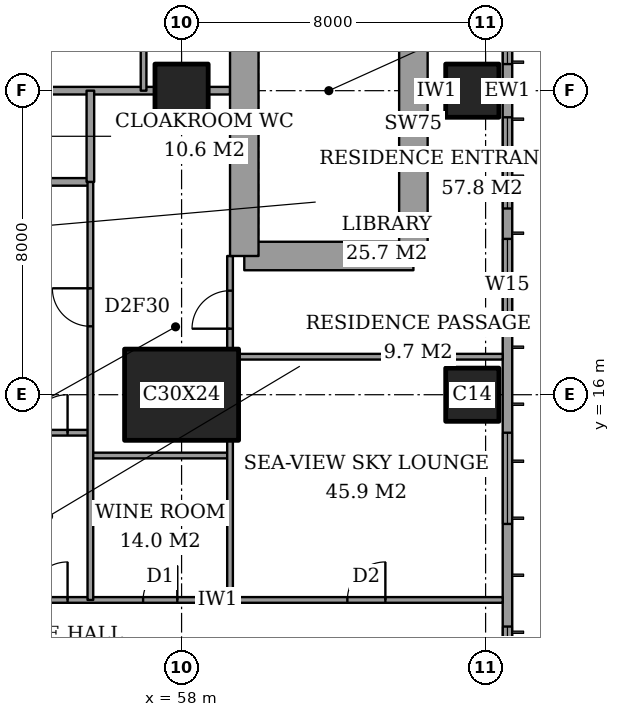
"""IFC4 building model, lengths in metres.
Left out: names, types, materials, properties, quantities, classifications, styles, units other than length and angle.
Written with IfcOpenShell. Run it as: python <this file> out.ifc"""

import sys

from ifc_helpers import new_model, si_unit, direction, frame, frame_2d, origin, origin_2d, place, context, subcontext, project, spatial, rectangle, extrude, element, fill, save


model = new_model("IFC4")
c1 = context("Model", 3, precision=1e-05, world=origin(), true_north=direction((0.0, 1.0)))
c2 = subcontext(c1, "Body", "Model", "MODEL_VIEW")
j1 = project(units=[si_unit("LENGTHUNIT", "METRE"), si_unit("PLANEANGLEUNIT", "RADIAN")], contexts=[c1])
p1 = place(None, origin())
s1 = spatial("IfcSite", under=j1, at=p1, CompositionType="ELEMENT")
p2 = place(p1, origin())
s2 = spatial("IfcBuilding", under=s1, at=p2, CompositionType="ELEMENT")
p3 = place(p2, frame((0.0, 0.0, 287.1)))
s3 = spatial("IfcBuildingStorey", under=s2, at=p3, CompositionType="ELEMENT", Elevation=287.1)
p4 = place(p3, frame((58.0, 16.0, 0.0), z_axis=(0.0, 0.0, 1.0), x_axis=(1.0, 0.0, 0.0)))
e1 = element("IfcColumn", 1, at=p4, inside=s3, PredefinedType="COLUMN", context=c2, shape_type="SweptSolid", body=[
    extrude(rectangle(XDim=3.0, YDim=2.4, at=origin_2d()), origin(), (0.0, 0.0, 1.0), 4.5),
])
for number, where, z_axis, x_axis in (
    (2, (58.0, 24.0, 0.0), (0.0, 0.0, 1.0), (1.0, 0.0, 0.0)),
    (3, (65.65, 16.0, 0.0), (0.0, 0.0, 1.0), (1.0, 0.0, 0.0)),
    (4, (65.65, 24.0, 0.0), (0.0, 0.0, 1.0), (1.0, 0.0, 0.0)),
):
    element("IfcColumn", number, at=place(p3, frame(where, z_axis=z_axis, x_axis=x_axis)), inside=s3, PredefinedType="COLUMN", context=c2, shape_type="SweptSolid", body=[
        extrude(rectangle(XDim=1.4, YDim=1.4, at=origin_2d()), origin(), (0.0, 0.0, 1.0), 4.5),
    ])
p5 = place(p3, frame((59.65, 19.65, 0.0), z_axis=(0.0, 0.0, 1.0), x_axis=(1.0, 0.0, 0.0)))
e5 = element("IfcWall", 5, at=p5, inside=s3, PredefinedType="SHEAR", context=c2, shape_type="SweptSolid", body=[
    extrude(rectangle(XDim=4.45, YDim=0.75, at=frame_2d((2.225, 0.0))), origin(), (0.0, 0.0, 1.0), 4.5),
])
p6 = place(p3, frame((64.1, 19.65, 0.0), z_axis=(0.0, 0.0, 1.0), x_axis=(0.0, 1.0, 0.0)))
e6 = element("IfcWall", 6, at=p6, inside=s3, PredefinedType="SHEAR", context=c2, shape_type="SweptSolid", body=[
    extrude(rectangle(XDim=8.7, YDim=0.75, at=frame_2d((4.35, 0.0))), origin(), (0.0, 0.0, 1.0), 4.5),
])
p7 = place(p3, frame((59.65, 28.35, 0.0), z_axis=(0.0, 0.0, 1.0), x_axis=(0.0, -1.0, 0.0)))
e7 = element("IfcWall", 7, at=p7, inside=s3, PredefinedType="SHEAR", context=c2, shape_type="SweptSolid", body=[
    extrude(rectangle(XDim=8.7, YDim=0.75, at=frame_2d((4.35, 0.0))), origin(), (0.0, 0.0, 1.0), 4.5),
])
p8 = place(p7, frame((0.975, 0.0, 0.0)))
e8 = element("IfcOpeningElement", 8, at=p8, cuts=e7, PredefinedType="OPENING", context=c2, shape_type="SweptSolid", body=[
    extrude(rectangle(XDim=1.0, YDim=2.1, at=frame_2d((0.5, 1.05))), frame((0.0, 0.385, 0.0), z_axis=(0.0, -1.0, 0.0), x_axis=(1.0, 0.0, 0.0)), (0.0, 0.0, 1.0), 0.77),
])
p9 = place(p3, frame((66.575, 3.175, 0.0), z_axis=(0.0, 0.0, 1.0), x_axis=(0.0, 1.0, 0.0)))
e9 = element("IfcWall", 9, at=p9, inside=s3, PredefinedType="SOLIDWALL", context=c2, shape_type="SweptSolid", body=[
    extrude(rectangle(XDim=41.65, YDim=0.25, at=frame_2d((20.825, 0.0))), origin(), (0.0, 0.0, 1.0), 4.5),
])
p10 = place(p9, frame((1.275, 0.0, 0.6)))
e10 = element("IfcOpeningElement", 10, at=p10, cuts=e9, PredefinedType="OPENING", context=c2, shape_type="SweptSolid", body=[
    extrude(rectangle(XDim=2.4, YDim=2.8, at=frame_2d((1.2, 1.4))), frame((0.0, 0.135, 0.0), z_axis=(0.0, -1.0, 0.0), x_axis=(1.0, 0.0, 0.0)), (0.0, 0.0, 1.0), 0.27),
])
p11 = place(p9, frame((5.525, 0.0, 0.6)))
e11 = element("IfcOpeningElement", 11, at=p11, cuts=e9, PredefinedType="OPENING", context=c2, shape_type="SweptSolid", body=[
    extrude(rectangle(XDim=1.2, YDim=2.8, at=frame_2d((0.6, 1.4))), frame((0.0, 0.135, 0.0), z_axis=(0.0, -1.0, 0.0), x_axis=(1.0, 0.0, 0.0)), (0.0, 0.0, 1.0), 0.27),
])
p12 = place(p9, frame((9.425, 0.0, 0.6)))
e12 = element("IfcOpeningElement", 12, at=p12, cuts=e9, PredefinedType="OPENING", context=c2, shape_type="SweptSolid", body=[
    extrude(rectangle(XDim=2.4, YDim=2.8, at=frame_2d((1.2, 1.4))), frame((0.0, 0.135, 0.0), z_axis=(0.0, -1.0, 0.0), x_axis=(1.0, 0.0, 0.0)), (0.0, 0.0, 1.0), 0.27),
])
p13 = place(p9, frame((14.525, 0.0, 0.6)))
e13 = element("IfcOpeningElement", 13, at=p13, cuts=e9, PredefinedType="OPENING", context=c2, shape_type="SweptSolid", body=[
    extrude(rectangle(XDim=2.4, YDim=2.8, at=frame_2d((1.2, 1.4))), frame((0.0, 0.135, 0.0), z_axis=(0.0, -1.0, 0.0), x_axis=(1.0, 0.0, 0.0)), (0.0, 0.0, 1.0), 0.27),
])
p14 = place(p9, frame((17.725, 0.0, 0.6)))
e14 = element("IfcOpeningElement", 14, at=p14, cuts=e9, PredefinedType="OPENING", context=c2, shape_type="SweptSolid", body=[
    extrude(rectangle(XDim=2.4, YDim=2.8, at=frame_2d((1.2, 1.4))), frame((0.0, 0.135, 0.0), z_axis=(0.0, -1.0, 0.0), x_axis=(1.0, 0.0, 0.0)), (0.0, 0.0, 1.0), 0.27),
])
p15 = place(p9, frame((21.525, 0.0, 0.6)))
e15 = element("IfcOpeningElement", 15, at=p15, cuts=e9, PredefinedType="OPENING", context=c2, shape_type="SweptSolid", body=[
    extrude(rectangle(XDim=2.4, YDim=2.8, at=frame_2d((1.2, 1.4))), frame((0.0, 0.135, 0.0), z_axis=(0.0, -1.0, 0.0), x_axis=(1.0, 0.0, 0.0)), (0.0, 0.0, 1.0), 0.27),
])
p16 = place(p9, frame((24.725, 0.0, 0.6)))
e16 = element("IfcOpeningElement", 16, at=p16, cuts=e9, PredefinedType="OPENING", context=c2, shape_type="SweptSolid", body=[
    extrude(rectangle(XDim=2.4, YDim=2.8, at=frame_2d((1.2, 1.4))), frame((0.0, 0.135, 0.0), z_axis=(0.0, -1.0, 0.0), x_axis=(1.0, 0.0, 0.0)), (0.0, 0.0, 1.0), 0.27),
])
p17 = place(p9, frame((29.825, 0.0, 0.6)))
e17 = element("IfcOpeningElement", 17, at=p17, cuts=e9, PredefinedType="OPENING", context=c2, shape_type="SweptSolid", body=[
    extrude(rectangle(XDim=2.4, YDim=2.8, at=frame_2d((1.2, 1.4))), frame((0.0, 0.135, 0.0), z_axis=(0.0, -1.0, 0.0), x_axis=(1.0, 0.0, 0.0)), (0.0, 0.0, 1.0), 0.27),
])
p18 = place(p9, frame((35.025, 0.0, 0.6)))
e18 = element("IfcOpeningElement", 18, at=p18, cuts=e9, PredefinedType="OPENING", context=c2, shape_type="SweptSolid", body=[
    extrude(rectangle(XDim=1.2, YDim=2.8, at=frame_2d((0.6, 1.4))), frame((0.0, 0.135, 0.0), z_axis=(0.0, -1.0, 0.0), x_axis=(1.0, 0.0, 0.0)), (0.0, 0.0, 1.0), 0.27),
])
p19 = place(p9, frame((38.075, 0.0, 0.6)))
e19 = element("IfcOpeningElement", 19, at=p19, cuts=e9, PredefinedType="OPENING", context=c2, shape_type="SweptSolid", body=[
    extrude(rectangle(XDim=2.4, YDim=2.8, at=frame_2d((1.2, 1.4))), frame((0.0, 0.135, 0.0), z_axis=(0.0, -1.0, 0.0), x_axis=(1.0, 0.0, 0.0)), (0.0, 0.0, 1.0), 0.27),
])
p20 = place(p3, frame((41.439, 10.6, 0.0), z_axis=(0.0, 0.0, 1.0), x_axis=(1.0, 0.0, 0.0)))
e20 = element("IfcWall", 20, at=p20, inside=s3, PredefinedType="PARTITIONING", context=c2, shape_type="SweptSolid", body=[
    extrude(rectangle(XDim=25.011, YDim=0.15, at=frame_2d((12.505, 0.0))), origin(), (0.0, 0.0, 1.0), 4.2),
])
p21 = place(p20, frame((12.561, 0.0, 0.0)))
e21 = element("IfcOpeningElement", 21, at=p21, cuts=e20, PredefinedType="OPENING", context=c2, shape_type="SweptSolid", body=[
    extrude(rectangle(XDim=1.0, YDim=2.1, at=frame_2d((0.5, 1.05))), frame((0.0, 0.085, 0.0), z_axis=(0.0, -1.0, 0.0), x_axis=(1.0, 0.0, 0.0)), (0.0, 0.0, 1.0), 0.17),
])
p22 = place(p20, frame((20.924, 0.0, 0.0)))
e22 = element("IfcOpeningElement", 22, at=p22, cuts=e20, PredefinedType="OPENING", context=c2, shape_type="SweptSolid", body=[
    extrude(rectangle(XDim=1.0, YDim=2.1, at=frame_2d((0.5, 1.05))), frame((0.0, 0.085, 0.0), z_axis=(0.0, -1.0, 0.0), x_axis=(1.0, 0.0, 0.0)), (0.0, 0.0, 1.0), 0.17),
])
p23 = place(p20, frame((15.549, 0.0, 0.0)))
e23 = element("IfcOpeningElement", 23, at=p23, cuts=e20, PredefinedType="OPENING", context=c2, shape_type="SweptSolid", body=[
    extrude(rectangle(XDim=0.9, YDim=2.1, at=frame_2d((0.45, 1.05))), frame((0.0, 0.085, 0.0), z_axis=(0.0, -1.0, 0.0), x_axis=(1.0, 0.0, 0.0)), (0.0, 0.0, 1.0), 0.17),
])
p24 = place(p20, frame((10.161, 0.0, 0.0)))
e24 = element("IfcOpeningElement", 24, at=p24, cuts=e20, PredefinedType="OPENING", context=c2, shape_type="SweptSolid", body=[
    extrude(rectangle(XDim=1.0, YDim=2.1, at=frame_2d((0.5, 1.05))), frame((0.0, 0.085, 0.0), z_axis=(0.0, -1.0, 0.0), x_axis=(1.0, 0.0, 0.0)), (0.0, 0.0, 1.0), 0.17),
])
p25 = place(p20, frame((7.511, 0.0, 0.0)))
e25 = element("IfcOpeningElement", 25, at=p25, cuts=e20, PredefinedType="OPENING", context=c2, shape_type="SweptSolid", body=[
    extrude(rectangle(XDim=0.9, YDim=2.1, at=frame_2d((0.45, 1.05))), frame((0.0, 0.085, 0.0), z_axis=(0.0, -1.0, 0.0), x_axis=(1.0, 0.0, 0.0)), (0.0, 0.0, 1.0), 0.17),
])
p26 = place(p20, frame((2.836, 0.0, 0.0)))
e26 = element("IfcOpeningElement", 26, at=p26, cuts=e20, PredefinedType="OPENING", context=c2, shape_type="SweptSolid", body=[
    extrude(rectangle(XDim=1.0, YDim=2.1, at=frame_2d((0.5, 1.05))), frame((0.0, 0.085, 0.0), z_axis=(0.0, -1.0, 0.0), x_axis=(1.0, 0.0, 0.0)), (0.0, 0.0, 1.0), 0.17),
])
p27 = place(p3, frame((55.6, 14.4, 0.0), z_axis=(0.0, 0.0, 1.0), x_axis=(1.0, 0.0, 0.0)))
e27 = element("IfcWall", 27, at=p27, inside=s3, PredefinedType="PARTITIONING", context=c2, shape_type="SweptSolid", body=[
    extrude(rectangle(XDim=3.675, YDim=0.15, at=frame_2d((1.837, 0.0))), origin(), (0.0, 0.0, 1.0), 4.2),
])
p28 = place(p3, frame((51.5, 15.0, 0.0), z_axis=(0.0, 0.0, 1.0), x_axis=(1.0, 0.0, 0.0)))
e28 = element("IfcWall", 28, at=p28, inside=s3, PredefinedType="PARTITIONING", context=c2, shape_type="SweptSolid", body=[
    extrude(rectangle(XDim=4.1, YDim=0.15, at=frame_2d((2.05, 0.0))), origin(), (0.0, 0.0, 1.0), 4.2),
])
p29 = place(p28, frame((2.5, 0.0, 0.0)))
e29 = element("IfcOpeningElement", 29, at=p29, cuts=e28, PredefinedType="OPENING", context=c2, shape_type="SweptSolid", body=[
    extrude(rectangle(XDim=1.0, YDim=2.1, at=frame_2d((0.5, 1.05))), frame((0.0, 0.085, 0.0), z_axis=(0.0, -1.0, 0.0), x_axis=(1.0, 0.0, 0.0)), (0.0, 0.0, 1.0), 0.17),
])
p30 = place(p3, frame((59.5, 17.0, 0.0), z_axis=(0.0, 0.0, 1.0), x_axis=(1.0, 0.0, 0.0)))
e30 = element("IfcWall", 30, at=p30, inside=s3, PredefinedType="PARTITIONING", context=c2, shape_type="SweptSolid", body=[
    extrude(rectangle(XDim=6.95, YDim=0.15, at=frame_2d((3.475, 0.0))), origin(), (0.0, 0.0, 1.0), 4.2),
])
p31 = place(p3, frame((51.2, 21.6, 0.0), z_axis=(0.0, 0.0, 1.0), x_axis=(1.0, 0.0, 0.0)))
e31 = element("IfcWall", 31, at=p31, inside=s3, PredefinedType="PARTITIONING", context=c2, shape_type="SweptSolid", body=[
    extrude(rectangle(XDim=4.4, YDim=0.2, at=frame_2d((2.2, 0.0))), origin(), (0.0, 0.0, 1.0), 4.2),
])
p32 = place(p31, frame((1.75, 0.0, 0.0)))
e32 = element("IfcOpeningElement", 32, at=p32, cuts=e31, PredefinedType="OPENING", context=c2, shape_type="SweptSolid", body=[
    extrude(rectangle(XDim=0.9, YDim=2.1, at=frame_2d((0.45, 1.05))), frame((0.0, 0.11, 0.0), z_axis=(0.0, -1.0, 0.0), x_axis=(1.0, 0.0, 0.0)), (0.0, 0.0, 1.0), 0.22),
])
p33 = place(p3, frame((50.7, 24.0, 0.0), z_axis=(0.0, 0.0, 1.0), x_axis=(1.0, 0.0, 0.0)))
e33 = element("IfcWall", 33, at=p33, inside=s3, PredefinedType="PARTITIONING", context=c2, shape_type="SweptSolid", body=[
    extrude(rectangle(XDim=6.6, YDim=0.2, at=frame_2d((3.3, 0.0))), origin(), (0.0, 0.0, 1.0), 4.2),
])
p34 = place(p3, frame((58.7, 24.0, 0.0), z_axis=(0.0, 0.0, 1.0), x_axis=(1.0, 0.0, 0.0)))
e34 = element("IfcWall", 34, at=p34, inside=s3, PredefinedType="PARTITIONING", context=c2, shape_type="SweptSolid", body=[
    extrude(rectangle(XDim=0.575, YDim=0.2, at=frame_2d((0.288, 0.0))), origin(), (0.0, 0.0, 1.0), 4.2),
])
p35 = place(p3, frame((64.475, 24.0, 0.0), z_axis=(0.0, 0.0, 1.0), x_axis=(1.0, 0.0, 0.0)))
e35 = element("IfcWall", 35, at=p35, inside=s3, PredefinedType="PARTITIONING", context=c2, shape_type="SweptSolid", body=[
    extrude(rectangle(XDim=0.475, YDim=0.15, at=frame_2d((0.237, 0.0))), origin(), (0.0, 0.0, 1.0), 4.2),
])
p36 = place(p3, frame((55.6, 21.6, 0.0), z_axis=(0.0, 0.0, 1.0), x_axis=(0.0, 1.0, 0.0)))
e36 = element("IfcWall", 36, at=p36, inside=s3, PredefinedType="PARTITIONING", context=c2, shape_type="SweptSolid", body=[
    extrude(rectangle(XDim=2.4, YDim=0.2, at=frame_2d((1.2, 0.0))), origin(), (0.0, 0.0, 1.0), 4.2),
])
p37 = place(p3, frame((55.6, 10.6, 0.0), z_axis=(0.0, 0.0, 1.0), x_axis=(0.0, 1.0, 0.0)))
e37 = element("IfcWall", 37, at=p37, inside=s3, PredefinedType="PARTITIONING", context=c2, shape_type="SweptSolid", body=[
    extrude(rectangle(XDim=11.0, YDim=0.15, at=frame_2d((5.5, 0.0))), origin(), (0.0, 0.0, 1.0), 4.2),
])
p38 = place(p37, frame((7.2, 0.0, 0.0)))
e38 = element("IfcOpeningElement", 38, at=p38, cuts=e37, PredefinedType="OPENING", context=c2, shape_type="SweptSolid", body=[
    extrude(rectangle(XDim=1.0, YDim=2.1, at=frame_2d((0.5, 1.05))), frame((0.0, 0.085, 0.0), z_axis=(0.0, -1.0, 0.0), x_axis=(1.0, 0.0, 0.0)), (0.0, 0.0, 1.0), 0.17),
])
p39 = place(p3, frame((57.0, 24.0, 0.0), z_axis=(0.0, 0.0, 1.0), x_axis=(0.0, 1.0, 0.0)))
e39 = element("IfcWall", 39, at=p39, inside=s3, PredefinedType="PARTITIONING", context=c2, shape_type="SweptSolid", body=[
    extrude(rectangle(XDim=1.6, YDim=0.15, at=frame_2d((0.8, 0.0))), origin(), (0.0, 0.0, 1.0), 4.2),
])
p40 = place(p3, frame((59.275, 10.6, 0.0), z_axis=(0.0, 0.0, 1.0), x_axis=(0.0, 1.0, 0.0)))
e40 = element("IfcWall", 40, at=p40, inside=s3, PredefinedType="PARTITIONING", context=c2, shape_type="SweptSolid", body=[
    extrude(rectangle(XDim=4.2, YDim=0.15, at=frame_2d((2.1, 0.0))), origin(), (0.0, 0.0, 1.0), 4.2),
])
p41 = place(p3, frame((59.275, 17.2, 0.0), z_axis=(0.0, 0.0, 1.0), x_axis=(0.0, 1.0, 0.0)))
e41 = element("IfcWall", 41, at=p41, inside=s3, PredefinedType="PARTITIONING", context=c2, shape_type="SweptSolid", body=[
    extrude(rectangle(XDim=2.45, YDim=0.15, at=frame_2d((1.225, 0.0))), origin(), (0.0, 0.0, 1.0), 4.2),
])
p42 = place(p41, frame((0.538, 0.0, 0.0)))
e42 = element("IfcOpeningElement", 42, at=p42, cuts=e41, PredefinedType="OPENING", context=c2, shape_type="SweptSolid", body=[
    extrude(rectangle(XDim=1.0, YDim=2.1, at=frame_2d((0.5, 1.05))), frame((0.0, 0.085, 0.0), z_axis=(0.0, -1.0, 0.0), x_axis=(1.0, 0.0, 0.0)), (0.0, 0.0, 1.0), 0.17),
])
p43 = place(p11, origin())
e43 = element("IfcWindow", 43, at=p43, inside=s3, PartitioningType="SINGLE_PANEL", PredefinedType="WINDOW", context=c2, shape_type="SweptSolid", body=[
    extrude(rectangle(XDim=1.2, YDim=2.8, at=frame_2d((0.6, 1.4))), frame((0.0, 0.03, 0.0), z_axis=(0.0, -1.0, 0.0), x_axis=(1.0, 0.0, 0.0)), (0.0, 0.0, 1.0), 0.06),
])
fill(e11, e43)
p44 = place(p12, origin())
e44 = element("IfcWindow", 44, at=p44, inside=s3, PartitioningType="SINGLE_PANEL", PredefinedType="WINDOW", context=c2, shape_type="SweptSolid", body=[
    extrude(rectangle(XDim=2.4, YDim=2.8, at=frame_2d((1.2, 1.4))), frame((0.0, 0.03, 0.0), z_axis=(0.0, -1.0, 0.0), x_axis=(1.0, 0.0, 0.0)), (0.0, 0.0, 1.0), 0.06),
])
fill(e12, e44)
p45 = place(p13, origin())
e45 = element("IfcWindow", 45, at=p45, inside=s3, PartitioningType="SINGLE_PANEL", PredefinedType="WINDOW", context=c2, shape_type="SweptSolid", body=[
    extrude(rectangle(XDim=2.4, YDim=2.8, at=frame_2d((1.2, 1.4))), frame((0.0, 0.03, 0.0), z_axis=(0.0, -1.0, 0.0), x_axis=(1.0, 0.0, 0.0)), (0.0, 0.0, 1.0), 0.06),
])
fill(e13, e45)
p46 = place(p14, origin())
e46 = element("IfcWindow", 46, at=p46, inside=s3, PartitioningType="SINGLE_PANEL", PredefinedType="WINDOW", context=c2, shape_type="SweptSolid", body=[
    extrude(rectangle(XDim=2.4, YDim=2.8, at=frame_2d((1.2, 1.4))), frame((0.0, 0.03, 0.0), z_axis=(0.0, -1.0, 0.0), x_axis=(1.0, 0.0, 0.0)), (0.0, 0.0, 1.0), 0.06),
])
fill(e14, e46)
p47 = place(p15, origin())
e47 = element("IfcWindow", 47, at=p47, inside=s3, PartitioningType="SINGLE_PANEL", PredefinedType="WINDOW", context=c2, shape_type="SweptSolid", body=[
    extrude(rectangle(XDim=2.4, YDim=2.8, at=frame_2d((1.2, 1.4))), frame((0.0, 0.03, 0.0), z_axis=(0.0, -1.0, 0.0), x_axis=(1.0, 0.0, 0.0)), (0.0, 0.0, 1.0), 0.06),
])
fill(e15, e47)
p48 = place(p21, origin())
e48 = element("IfcDoor", 48, at=p48, inside=s3, OperationType="SINGLE_SWING_LEFT", PredefinedType="DOOR", context=c2, shape_type="SweptSolid", body=[
    extrude(rectangle(XDim=1.0, YDim=2.1, at=frame_2d((0.5, 1.05))), frame((0.0, 0.025, 0.0), z_axis=(0.0, -1.0, 0.0), x_axis=(1.0, 0.0, 0.0)), (0.0, 0.0, 1.0), 0.05),
])
fill(e21, e48)
p49 = place(p22, origin())
e49 = element("IfcDoor", 49, at=p49, inside=s3, OperationType="SINGLE_SWING_LEFT", PredefinedType="DOOR", context=c2, shape_type="SweptSolid", body=[
    extrude(rectangle(XDim=1.0, YDim=2.1, at=frame_2d((0.5, 1.05))), frame((0.0, 0.025, 0.0), z_axis=(0.0, -1.0, 0.0), x_axis=(1.0, 0.0, 0.0)), (0.0, 0.0, 1.0), 0.05),
])
fill(e22, e49)
p50 = place(p42, origin())
e50 = element("IfcDoor", 50, at=p50, inside=s3, OperationType="SINGLE_SWING_RIGHT", PredefinedType="DOOR", context=c2, shape_type="SweptSolid", body=[
    extrude(rectangle(XDim=1.0, YDim=2.1, at=frame_2d((0.5, 1.05))), frame((0.0, 0.025, 0.0), z_axis=(0.0, -1.0, 0.0), x_axis=(1.0, 0.0, 0.0)), (0.0, 0.0, 1.0), 0.05),
])
fill(e42, e50)
p51 = place(p23, origin())
e51 = element("IfcDoor", 51, at=p51, inside=s3, OperationType="SINGLE_SWING_LEFT", PredefinedType="DOOR", context=c2, shape_type="SweptSolid", body=[
    extrude(rectangle(XDim=0.9, YDim=2.1, at=frame_2d((0.45, 1.05))), frame((0.0, 0.025, 0.0), z_axis=(0.0, -1.0, 0.0), x_axis=(1.0, 0.0, 0.0)), (0.0, 0.0, 1.0), 0.05),
])
fill(e23, e51)
p52 = place(p38, origin())
e52 = element("IfcDoor", 52, at=p52, inside=s3, OperationType="SINGLE_SWING_LEFT", PredefinedType="DOOR", context=c2, shape_type="SweptSolid", body=[
    extrude(rectangle(XDim=1.0, YDim=2.1, at=frame_2d((0.5, 1.05))), frame((0.0, 0.025, 0.0), z_axis=(0.0, -1.0, 0.0), x_axis=(1.0, 0.0, 0.0)), (0.0, 0.0, 1.0), 0.05),
])
fill(e38, e52)
p53 = place(p29, origin())
e53 = element("IfcDoor", 53, at=p53, inside=s3, OperationType="SINGLE_SWING_LEFT", PredefinedType="DOOR", context=c2, shape_type="SweptSolid", body=[
    extrude(rectangle(XDim=1.0, YDim=2.1, at=frame_2d((0.5, 1.05))), frame((0.0, 0.025, 0.0), z_axis=(0.0, -1.0, 0.0), x_axis=(1.0, 0.0, 0.0)), (0.0, 0.0, 1.0), 0.05),
])
fill(e29, e53)
save(model, sys.argv[1])
